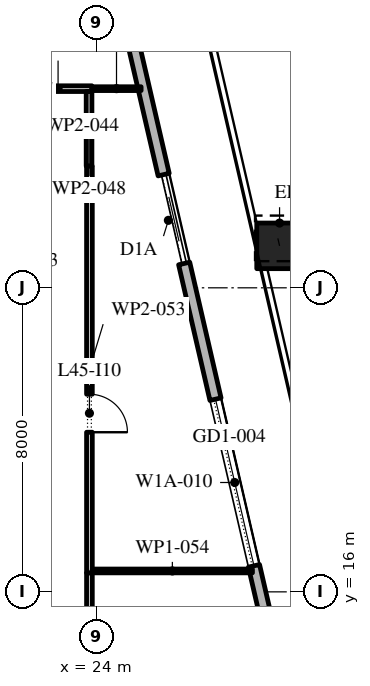
"""IFC4 building model, lengths in metres.
Left out: names, types, materials, properties, quantities, classifications, styles, units other than length and angle.
Written with IfcOpenShell. Run it as: python <this file> out.ifc"""

import sys

from ifc_helpers import new_model, si_unit, direction, frame, frame_2d, origin, origin_2d, place, context, subcontext, project, spatial, rectangle, extrude, element, fill, save


model = new_model("IFC4")
c1 = context("Model", 3, precision=1e-05, world=origin(), true_north=direction((0.0, 1.0)))
c2 = subcontext(c1, "Body", "Model", "MODEL_VIEW")
j1 = project(units=[si_unit("LENGTHUNIT", "METRE"), si_unit("PLANEANGLEUNIT", "RADIAN")], contexts=[c1])
p1 = place(None, origin())
s1 = spatial("IfcSite", under=j1, at=p1, CompositionType="ELEMENT")
p2 = place(p1, origin())
s2 = spatial("IfcBuilding", under=s1, at=p2, CompositionType="ELEMENT")
p3 = place(p2, frame((0.0, 0.0, 205.2)))
s3 = spatial("IfcBuildingStorey", under=s2, at=p3, CompositionType="ELEMENT", Elevation=205.2)
p4 = place(p3, frame((28.803, 25.104, 0.0), z_axis=(-0.010799648955, 0.046682353548, 0.998851403087), x_axis=(-0.974268511785, -0.225390476607, 0.0)))
e1 = element("IfcColumn", 1, at=p4, inside=s3, PredefinedType="COLUMN", context=c2, shape_type="SweptSolid", body=[
    extrude(rectangle(XDim=1.2, YDim=1.2, at=origin_2d()), origin(), (0.0, 0.0, 1.0), 4.205),
])
p5 = place(p3, frame((33.157, -5.092, 0.0), z_axis=(0.0, 0.0, 1.0), x_axis=(-0.224950279389, 0.974370243697, 0.0)))
e2 = element("IfcWall", 2, at=p5, inside=s3, PredefinedType="STANDARD", context=c2, shape_type="SweptSolid", body=[
    extrude(rectangle(XDim=49.5, YDim=0.3, at=frame_2d((24.75, 0.0))), origin(), (0.0, 0.0, 1.0), 4.0),
])
p6 = place(p5, frame((2.207, 0.0, 0.0)))
e3 = element("IfcOpeningElement", 3, at=p6, cuts=e2, PredefinedType="OPENING", context=c2, shape_type="SweptSolid", body=[
    extrude(rectangle(XDim=2.4, YDim=3.125, at=frame_2d((1.2, 1.562))), frame((0.0, 0.16, 0.0), z_axis=(0.0, -1.0, 0.0), x_axis=(1.0, 0.0, 0.0)), (0.0, 0.0, 1.0), 0.32),
])
p7 = place(p5, frame((8.121, 0.0, 0.45)))
e4 = element("IfcOpeningElement", 4, at=p7, cuts=e2, PredefinedType="OPENING", context=c2, shape_type="SweptSolid", body=[
    extrude(rectangle(XDim=4.5, YDim=2.875, at=frame_2d((2.25, 1.438))), frame((0.0, 0.16, 0.0), z_axis=(0.0, -1.0, 0.0), x_axis=(1.0, 0.0, 0.0)), (0.0, 0.0, 1.0), 0.32),
])
p8 = place(p5, frame((15.236, 0.0, 0.45)))
e5 = element("IfcOpeningElement", 5, at=p8, cuts=e2, PredefinedType="OPENING", context=c2, shape_type="SweptSolid", body=[
    extrude(rectangle(XDim=4.5, YDim=2.875, at=frame_2d((2.25, 1.438))), frame((0.0, 0.16, 0.0), z_axis=(0.0, -1.0, 0.0), x_axis=(1.0, 0.0, 0.0)), (0.0, 0.0, 1.0), 0.32),
])
p9 = place(p5, frame((22.35, 0.0, 0.45)))
e6 = element("IfcOpeningElement", 6, at=p9, cuts=e2, PredefinedType="OPENING", context=c2, shape_type="SweptSolid", body=[
    extrude(rectangle(XDim=4.5, YDim=3.0, at=frame_2d((2.25, 1.5))), frame((0.0, 0.16, 0.0), z_axis=(0.0, -1.0, 0.0), x_axis=(1.0, 0.0, 0.0)), (0.0, 0.0, 1.0), 0.32),
])
p10 = place(p5, frame((30.514, 0.0, 0.0)))
e7 = element("IfcOpeningElement", 7, at=p10, cuts=e2, PredefinedType="OPENING", context=c2, shape_type="SweptSolid", body=[
    extrude(rectangle(XDim=2.4, YDim=3.45, at=frame_2d((1.2, 1.725))), frame((0.0, 0.16, 0.0), z_axis=(0.0, -1.0, 0.0), x_axis=(1.0, 0.0, 0.0)), (0.0, 0.0, 1.0), 0.32),
])
p11 = place(p5, frame((36.579, 0.0, 0.45)))
e8 = element("IfcOpeningElement", 8, at=p11, cuts=e2, PredefinedType="OPENING", context=c2, shape_type="SweptSolid", body=[
    extrude(rectangle(XDim=4.5, YDim=3.05, at=frame_2d((2.25, 1.525))), frame((0.0, 0.16, 0.0), z_axis=(0.0, -1.0, 0.0), x_axis=(1.0, 0.0, 0.0)), (0.0, 0.0, 1.0), 0.32),
])
p12 = place(p5, frame((43.693, 0.0, 0.45)))
e9 = element("IfcOpeningElement", 9, at=p12, cuts=e2, PredefinedType="OPENING", context=c2, shape_type="SweptSolid", body=[
    extrude(rectangle(XDim=4.5, YDim=3.05, at=frame_2d((2.25, 1.525))), frame((0.0, 0.16, 0.0), z_axis=(0.0, -1.0, 0.0), x_axis=(1.0, 0.0, 0.0)), (0.0, 0.0, 1.0), 0.32),
])
p13 = place(p3, frame((22.085, 29.24, 0.0), z_axis=(0.0, 0.0, 1.0), x_axis=(1.0, 0.0, 0.0)))
e10 = element("IfcWall", 10, at=p13, inside=s3, PredefinedType="PARTITIONING", context=c2, shape_type="SweptSolid", body=[
    extrude(rectangle(XDim=1.78, YDim=0.15, at=frame_2d((0.89, 0.0))), origin(), (0.0, 0.0, 1.0), 4.0),
])
p14 = place(p3, frame((23.79, 29.165, 0.0), z_axis=(0.0, 0.0, 1.0), x_axis=(0.0, -1.0, 0.0)))
e11 = element("IfcWall", 11, at=p14, inside=s3, PredefinedType="PARTITIONING", context=c2, shape_type="SweptSolid", body=[
    extrude(rectangle(XDim=1.965, YDim=0.15, at=frame_2d((0.982, 0.0))), origin(), (0.0, 0.0, 1.0), 4.0),
])
p15 = place(p3, frame((23.865, 29.24, 0.0), z_axis=(0.0, 0.0, 1.0), x_axis=(1.0, 0.0, 0.0)))
e12 = element("IfcWall", 12, at=p15, inside=s3, PredefinedType="PARTITIONING", context=c2, shape_type="SweptSolid", body=[
    extrude(rectangle(XDim=1.295, YDim=0.1, at=frame_2d((0.647, 0.0))), origin(), (0.0, 0.0, 1.0), 4.0),
])
p16 = place(p3, frame((23.8, 16.5, 0.0), z_axis=(0.0, 0.0, 1.0), x_axis=(0.0, -1.0, 0.0)))
e13 = element("IfcWall", 13, at=p16, inside=s3, PredefinedType="PARTITIONING", context=c2, shape_type="SweptSolid", body=[
    extrude(rectangle(XDim=6.93, YDim=0.15, at=frame_2d((3.465, 0.0))), origin(), (0.0, 0.0, 1.0), 4.0),
])
p17 = place(p16, frame((2.98, 0.0, 0.0)))
e14 = element("IfcOpeningElement", 14, at=p17, cuts=e13, PredefinedType="OPENING", context=c2, shape_type="SweptSolid", body=[
    extrude(rectangle(XDim=1.0, YDim=2.1, at=frame_2d((0.5, 1.05))), frame((0.0, 0.085, 0.0), z_axis=(0.0, -1.0, 0.0), x_axis=(1.0, 0.0, 0.0)), (0.0, 0.0, 1.0), 0.17),
])
p18 = place(p3, frame((23.8, 27.2, 0.0), z_axis=(0.0, 0.0, 1.0), x_axis=(0.0, -1.0, 0.0)))
e15 = element("IfcWall", 15, at=p18, inside=s3, PredefinedType="PARTITIONING", context=c2, shape_type="SweptSolid", body=[
    extrude(rectangle(XDim=10.7, YDim=0.15, at=frame_2d((5.35, 0.0))), origin(), (0.0, 0.0, 1.0), 4.0),
])
p19 = place(p18, frame((6.0, 0.0, 0.0)))
e16 = element("IfcOpeningElement", 16, at=p19, cuts=e15, PredefinedType="OPENING", context=c2, shape_type="SweptSolid", body=[
    extrude(rectangle(XDim=1.0, YDim=2.1, at=frame_2d((0.5, 1.05))), frame((0.0, 0.085, 0.0), z_axis=(0.0, -1.0, 0.0), x_axis=(1.0, 0.0, 0.0)), (0.0, 0.0, 1.0), 0.17),
])
p20 = place(p3, frame((28.089, 16.55, 0.0), z_axis=(0.0, 0.0, 1.0), x_axis=(-1.0, 0.0, 0.0)))
e17 = element("IfcWall", 17, at=p20, inside=s3, PredefinedType="PARTITIONING", context=c2, shape_type="SweptSolid", body=[
    extrude(rectangle(XDim=4.214, YDim=0.1, at=frame_2d((2.107, 0.0))), origin(), (0.0, 0.0, 1.0), 4.0),
])
p21 = place(p9, origin())
e18 = element("IfcWindow", 18, at=p21, inside=s3, PartitioningType="DOUBLE_PANEL_VERTICAL", PredefinedType="WINDOW", context=c2, shape_type="SweptSolid", body=[
    extrude(rectangle(XDim=4.5, YDim=3.0, at=frame_2d((2.25, 1.5))), frame((0.0, 0.03, 0.0), z_axis=(0.0, -1.0, 0.0), x_axis=(1.0, 0.0, 0.0)), (0.0, 0.0, 1.0), 0.06),
])
fill(e6, e18)
p22 = place(p10, origin())
e19 = element("IfcDoor", 19, at=p22, inside=s3, OperationType="DOUBLE_DOOR_SLIDING", PredefinedType="DOOR", context=c2, shape_type="SweptSolid", body=[
    extrude(rectangle(XDim=2.4, YDim=3.45, at=frame_2d((1.2, 1.725))), frame((0.0, 0.025, 0.0), z_axis=(0.0, -1.0, 0.0), x_axis=(1.0, 0.0, 0.0)), (0.0, 0.0, 1.0), 0.05),
])
fill(e7, e19)
p23 = place(p19, origin())
e20 = element("IfcDoor", 20, at=p23, inside=s3, OperationType="SINGLE_SWING_LEFT", PredefinedType="DOOR", context=c2, shape_type="SweptSolid", body=[
    extrude(rectangle(XDim=1.0, YDim=2.1, at=frame_2d((0.5, 1.05))), frame((0.0, 0.025, 0.0), z_axis=(0.0, -1.0, 0.0), x_axis=(1.0, 0.0, 0.0)), (0.0, 0.0, 1.0), 0.05),
])
fill(e16, e20)
save(model, sys.argv[1])
